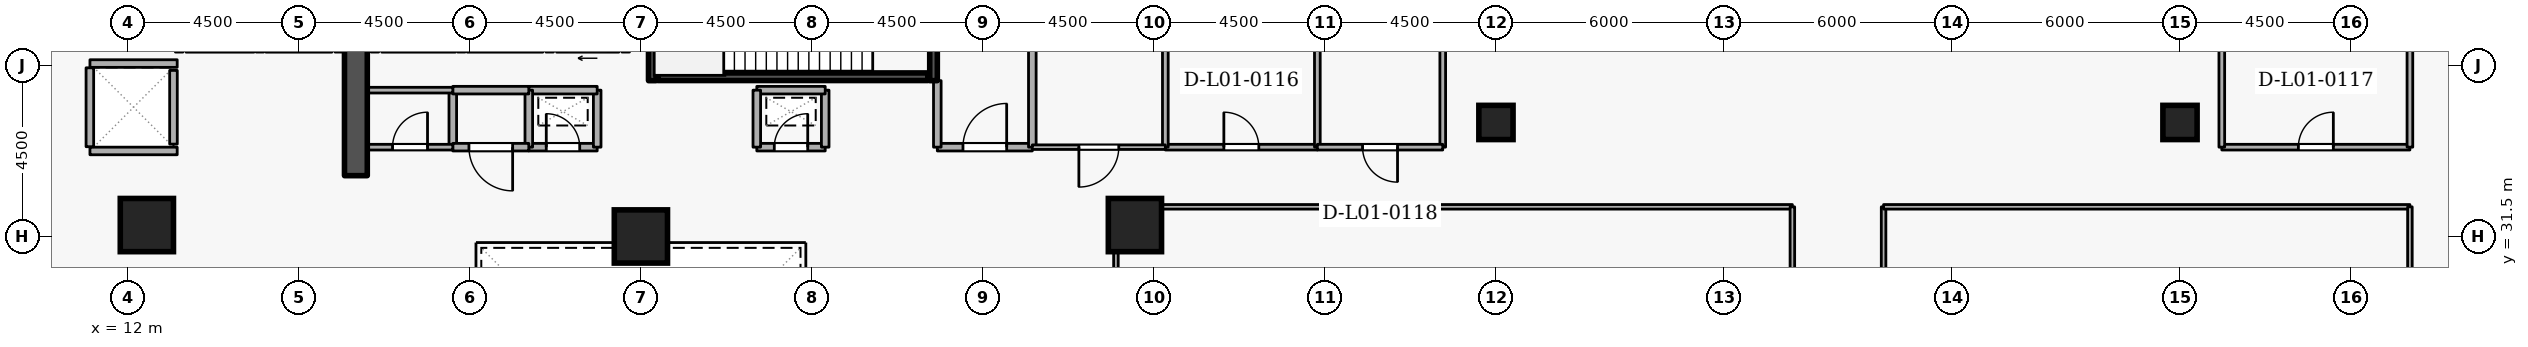
"""IFC4 building model, lengths in metres.
Left out: names, types, materials, properties, quantities, classifications, styles, units other than length and angle.
Written with IfcOpenShell. Run it as: python <this file> out.ifc"""

import sys

from ifc_helpers import new_model, si_unit, direction, frame, frame_2d, origin, origin_2d, place, context, subcontext, project, spatial, rectangle, extrude, element, fill, save


model = new_model("IFC4")
c1 = context("Model", 3, precision=1e-05, world=origin(), true_north=direction((0.0, 1.0)))
c2 = subcontext(c1, "Body", "Model", "MODEL_VIEW")
j1 = project(units=[si_unit("LENGTHUNIT", "METRE"), si_unit("PLANEANGLEUNIT", "RADIAN")], contexts=[c1])
p1 = place(None, origin())
s1 = spatial("IfcSite", under=j1, at=p1, CompositionType="ELEMENT")
p2 = place(p1, origin())
s2 = spatial("IfcBuilding", under=s1, at=p2, CompositionType="ELEMENT")
p3 = place(p2, frame((0.0, 0.0, 4.8)))
s3 = spatial("IfcBuildingStorey", under=s2, at=p3, CompositionType="ELEMENT", Elevation=4.8)
p4 = place(p3, frame((18.0, 33.1, 0.0), z_axis=(0.0, 0.0, 1.0), x_axis=(0.0, 1.0, 0.0)))
e1 = element("IfcWall", 1, at=p4, inside=s3, PredefinedType="SHEAR", context=c2, shape_type="SweptSolid", body=[
    extrude(rectangle(XDim=5.7, YDim=0.6, at=frame_2d((2.85, 0.0))), origin(), (0.0, 0.0, 1.0), 4.8),
])
for number, where, z_axis, x_axis in (
    (2, (12.5, 31.8, 0.0), (0.0, 0.0, 1.0), (1.0, 0.0, 0.0)),
    (3, (38.5, 31.8, 0.0), (0.0, 0.0, 1.0), (1.0, 0.0, 0.0)),
    (4, (25.5, 31.5, 0.0), (0.0, 0.0, 1.0), (1.0, 0.0, 0.0)),
):
    element("IfcColumn", number, at=place(p3, frame(where, z_axis=z_axis, x_axis=x_axis)), inside=s3, PredefinedType="COLUMN", context=c2, shape_type="SweptSolid", body=[
        extrude(rectangle(XDim=1.4, YDim=1.4, at=origin_2d()), origin(), (0.0, 0.0, 1.0), 4.8),
    ])
for number, where, z_axis, x_axis in (
    (5, (48.0, 34.5, 0.0), (0.0, 0.0, 1.0), (1.0, 0.0, 0.0)),
    (6, (66.0, 34.5, 0.0), (0.0, 0.0, 1.0), (1.0, 0.0, 0.0)),
):
    element("IfcColumn", number, at=place(p3, frame(where, z_axis=z_axis, x_axis=x_axis)), inside=s3, PredefinedType="COLUMN", context=c2, shape_type="SweptSolid", body=[
        extrude(rectangle(XDim=0.9, YDim=0.9, at=origin_2d()), origin(), (0.0, 0.0, 1.0), 4.8),
    ])
p5 = place(p3, frame((24.92, 36.45, 0.0), z_axis=(0.0, 0.0, 1.0), x_axis=(-1.0, 0.0, 0.0)))
e7 = element("IfcWall", 7, at=p5, inside=s3, PredefinedType="STANDARD", context=c2, shape_type="SweptSolid", body=[
    extrude(rectangle(XDim=1.64, YDim=0.2, at=frame_2d((0.82, 0.0))), origin(), (0.0, 0.0, 1.0), 4.46),
])
p6 = place(p5, frame((0.31, 0.0, 0.0)))
e8 = element("IfcOpeningElement", 8, at=p6, cuts=e7, PredefinedType="OPENING", context=c2, shape_type="SweptSolid", body=[
    extrude(rectangle(XDim=1.02, YDim=2.06, at=frame_2d((0.51, 1.03))), frame((0.0, 0.11, 0.0), z_axis=(0.0, -1.0, 0.0), x_axis=(1.0, 0.0, 0.0)), (0.0, 0.0, 1.0), 0.22),
])
p7 = place(p3, frame((22.92, 36.45, 0.0), z_axis=(0.0, 0.0, 1.0), x_axis=(-1.0, 0.0, 0.0)))
e9 = element("IfcWall", 9, at=p7, inside=s3, PredefinedType="STANDARD", context=c2, shape_type="SweptSolid", body=[
    extrude(rectangle(XDim=1.99, YDim=0.2, at=frame_2d((0.995, 0.0))), origin(), (0.0, 0.0, 1.0), 4.46),
])
p8 = place(p3, frame((20.62, 36.45, 0.0), z_axis=(0.0, 0.0, 1.0), x_axis=(-1.0, 0.0, 0.0)))
e10 = element("IfcWall", 10, at=p8, inside=s3, PredefinedType="STANDARD", context=c2, shape_type="SweptSolid", body=[
    extrude(rectangle(XDim=1.94, YDim=0.2, at=frame_2d((0.97, 0.0))), origin(), (0.0, 0.0, 1.0), 4.46),
])
p9 = place(p3, frame((17.37, 36.45, 0.0), z_axis=(0.0, 0.0, 1.0), x_axis=(-1.0, 0.0, 0.0)))
e11 = element("IfcWall", 11, at=p9, inside=s3, PredefinedType="STANDARD", context=c2, shape_type="SweptSolid", body=[
    extrude(rectangle(XDim=1.74, YDim=0.2, at=frame_2d((0.87, 0.0))), origin(), (0.0, 0.0, 1.0), 4.46),
])
p10 = place(p3, frame((15.32, 36.45, 0.0), z_axis=(0.0, 0.0, 1.0), x_axis=(-1.0, 0.0, 0.0)))
e12 = element("IfcWall", 12, at=p10, inside=s3, PredefinedType="STANDARD", context=c2, shape_type="SweptSolid", body=[
    extrude(rectangle(XDim=1.79, YDim=0.2, at=frame_2d((0.895, 0.0))), origin(), (0.0, 0.0, 1.0), 4.46),
])
p11 = place(p3, frame((13.2, 33.93, 0.0), z_axis=(0.0, 0.0, 1.0), x_axis=(0.0, 1.0, 0.0)))
e13 = element("IfcWall", 13, at=p11, inside=s3, PredefinedType="STANDARD", context=c2, shape_type="SweptSolid", body=[
    extrude(rectangle(XDim=1.94, YDim=0.2, at=frame_2d((0.97, 0.0))), origin(), (0.0, 0.0, 1.0), 4.46),
])
for number, where, z_axis, x_axis in (
    (14, (11.002, 36.05, 0.0), (0.0, 0.0, 1.0), (1.0, 0.0, 0.0)),
    (15, (11.002, 33.75, 0.0), (0.0, 0.0, 1.0), (1.0, 0.0, 0.0)),
):
    element("IfcWall", number, at=place(p3, frame(where, z_axis=z_axis, x_axis=x_axis)), inside=s3, PredefinedType="STANDARD", context=c2, shape_type="SweptSolid", body=[
        extrude(rectangle(XDim=2.296, YDim=0.2, at=frame_2d((1.148, 0.0))), origin(), (0.0, 0.0, 1.0), 4.46),
    ])
p12 = place(p3, frame((11.0, 33.862, 0.0), z_axis=(0.0, 0.0, 1.0), x_axis=(0.0, 1.0, 0.0)))
e16 = element("IfcWall", 16, at=p12, inside=s3, PredefinedType="STANDARD", context=c2, shape_type="SweptSolid", body=[
    extrude(rectangle(XDim=2.076, YDim=0.2, at=frame_2d((1.038, 0.0))), origin(), (0.0, 0.0, 1.0), 4.46),
])
p13 = place(p3, frame((33.2, 38.95, 0.0), z_axis=(0.0, 0.0, 1.0), x_axis=(0.0, -1.0, 0.0)))
e17 = element("IfcWall", 17, at=p13, inside=s3, PredefinedType="SHEAR", context=c2, shape_type="SweptSolid", body=[
    extrude(rectangle(XDim=3.35, YDim=0.2, at=frame_2d((1.675, 0.0))), origin(), (0.0, 0.0, 1.0), 4.8),
])
p14 = place(p13, frame((1.125, 0.0, 0.0)))
e18 = element("IfcOpeningElement", 18, at=p14, cuts=e17, PredefinedType="OPENING", context=c2, shape_type="SweptSolid", body=[
    extrude(rectangle(XDim=1.1, YDim=2.1, at=frame_2d((0.55, 1.05))), frame((0.0, 0.11, 0.0), z_axis=(0.0, -1.0, 0.0), x_axis=(1.0, 0.0, 0.0)), (0.0, 0.0, 1.0), 0.22),
])
p15 = place(p3, frame((25.8, 35.6, 0.0), z_axis=(0.0, 0.0, 1.0), x_axis=(0.0, 1.0, 0.0)))
e19 = element("IfcWall", 19, at=p15, inside=s3, PredefinedType="SHEAR", context=c2, shape_type="SweptSolid", body=[
    extrude(rectangle(XDim=3.35, YDim=0.2, at=frame_2d((1.675, 0.0))), origin(), (0.0, 0.0, 1.0), 4.8),
])
p16 = place(p3, frame((25.95, 35.703, 0.0), z_axis=(0.0, 0.0, 1.0), x_axis=(1.0, 0.0, 0.0)))
e20 = element("IfcWall", 20, at=p16, inside=s3, PredefinedType="SHEAR", context=c2, shape_type="SweptSolid", body=[
    extrude(rectangle(XDim=7.1, YDim=0.2, at=frame_2d((3.55, 0.0))), origin(), (0.0, 0.0, 1.0), 4.8),
])
p17 = place(p3, frame((33.3, 33.85, 0.0), z_axis=(0.0, 0.0, 1.0), x_axis=(1.0, 0.0, 0.0)))
e21 = element("IfcWall", 21, at=p17, inside=s3, PredefinedType="STANDARD", context=c2, shape_type="SweptSolid", body=[
    extrude(rectangle(XDim=2.5, YDim=0.2, at=frame_2d((1.25, 0.0))), origin(), (0.0, 0.0, 1.0), 4.46),
])
p18 = place(p17, frame((0.675, 0.0, 0.0)))
e22 = element("IfcOpeningElement", 22, at=p18, cuts=e21, PredefinedType="OPENING", context=c2, shape_type="SweptSolid", body=[
    extrude(rectangle(XDim=1.15, YDim=2.1, at=frame_2d((0.575, 1.05))), frame((0.0, 0.11, 0.0), z_axis=(0.0, -1.0, 0.0), x_axis=(1.0, 0.0, 0.0)), (0.0, 0.0, 1.0), 0.22),
])
p19 = place(p3, frame((35.8, 33.85, 0.0), z_axis=(0.0, 0.0, 1.0), x_axis=(0.0, 1.0, 0.0)))
e23 = element("IfcWall", 23, at=p19, inside=s3, PredefinedType="STANDARD", context=c2, shape_type="SweptSolid", body=[
    extrude(rectangle(XDim=5.15, YDim=0.2, at=frame_2d((2.575, 0.0))), origin(), (0.0, 0.0, 1.0), 4.46),
])
p20 = place(p3, frame((33.3, 35.6, 0.0), z_axis=(0.0, 0.0, 1.0), x_axis=(0.0, -1.0, 0.0)))
e24 = element("IfcWall", 24, at=p20, inside=s3, PredefinedType="STANDARD", context=c2, shape_type="SweptSolid", body=[
    extrude(rectangle(XDim=1.75, YDim=0.2, at=frame_2d((0.875, 0.0))), origin(), (0.0, 0.0, 1.0), 3.665),
])
p21 = place(p3, frame((22.55, 33.85, 0.0), z_axis=(0.0, 0.0, 1.0), x_axis=(1.0, 0.0, 0.0)))
e25 = element("IfcWall", 25, at=p21, inside=s3, PredefinedType="STANDARD", context=c2, shape_type="SweptSolid", body=[
    extrude(rectangle(XDim=1.8, YDim=0.2, at=frame_2d((0.9, 0.0))), origin(), (0.0, 0.0, 1.0), 4.46),
])
p22 = place(p21, frame((0.46, 0.0, 0.0)))
e26 = element("IfcOpeningElement", 26, at=p22, cuts=e25, PredefinedType="OPENING", context=c2, shape_type="SweptSolid", body=[
    extrude(rectangle(XDim=0.88, YDim=2.04, at=frame_2d((0.44, 1.02))), frame((0.0, 0.11, 0.0), z_axis=(0.0, -1.0, 0.0), x_axis=(1.0, 0.0, 0.0)), (0.0, 0.0, 1.0), 0.22),
])
p23 = place(p3, frame((24.35, 33.85, 0.0), z_axis=(0.0, 0.0, 1.0), x_axis=(0.0, 1.0, 0.0)))
e27 = element("IfcWall", 27, at=p23, inside=s3, PredefinedType="STANDARD", context=c2, shape_type="SweptSolid", body=[
    extrude(rectangle(XDim=1.5, YDim=0.2, at=frame_2d((0.75, 0.0))), origin(), (0.0, 0.0, 1.0), 4.46),
])
p24 = place(p3, frame((24.35, 35.35, 0.0), z_axis=(0.0, 0.0, 1.0), x_axis=(-1.0, 0.0, 0.0)))
e28 = element("IfcWall", 28, at=p24, inside=s3, PredefinedType="STANDARD", context=c2, shape_type="SweptSolid", body=[
    extrude(rectangle(XDim=1.8, YDim=0.2, at=frame_2d((0.9, 0.0))), origin(), (0.0, 0.0, 1.0), 4.46),
])
p25 = place(p3, frame((22.55, 35.35, 0.0), z_axis=(0.0, 0.0, 1.0), x_axis=(0.0, -1.0, 0.0)))
e29 = element("IfcWall", 29, at=p25, inside=s3, PredefinedType="STANDARD", context=c2, shape_type="SweptSolid", body=[
    extrude(rectangle(XDim=1.5, YDim=0.2, at=frame_2d((0.75, 0.0))), origin(), (0.0, 0.0, 1.0), 4.46),
])
p26 = place(p3, frame((28.55, 33.85, 0.0), z_axis=(0.0, 0.0, 1.0), x_axis=(1.0, 0.0, 0.0)))
e30 = element("IfcWall", 30, at=p26, inside=s3, PredefinedType="STANDARD", context=c2, shape_type="SweptSolid", body=[
    extrude(rectangle(XDim=1.8, YDim=0.2, at=frame_2d((0.9, 0.0))), origin(), (0.0, 0.0, 1.0), 4.46),
])
p27 = place(p26, frame((0.46, 0.0, 0.0)))
e31 = element("IfcOpeningElement", 31, at=p27, cuts=e30, PredefinedType="OPENING", context=c2, shape_type="SweptSolid", body=[
    extrude(rectangle(XDim=0.88, YDim=2.04, at=frame_2d((0.44, 1.02))), frame((0.0, 0.11, 0.0), z_axis=(0.0, -1.0, 0.0), x_axis=(1.0, 0.0, 0.0)), (0.0, 0.0, 1.0), 0.22),
])
p28 = place(p3, frame((30.35, 33.85, 0.0), z_axis=(0.0, 0.0, 1.0), x_axis=(0.0, 1.0, 0.0)))
e32 = element("IfcWall", 32, at=p28, inside=s3, PredefinedType="STANDARD", context=c2, shape_type="SweptSolid", body=[
    extrude(rectangle(XDim=1.5, YDim=0.2, at=frame_2d((0.75, 0.0))), origin(), (0.0, 0.0, 1.0), 4.46),
])
p29 = place(p3, frame((30.35, 35.35, 0.0), z_axis=(0.0, 0.0, 1.0), x_axis=(-1.0, 0.0, 0.0)))
e33 = element("IfcWall", 33, at=p29, inside=s3, PredefinedType="STANDARD", context=c2, shape_type="SweptSolid", body=[
    extrude(rectangle(XDim=1.8, YDim=0.2, at=frame_2d((0.9, 0.0))), origin(), (0.0, 0.0, 1.0), 4.46),
])
for number, where, z_axis, x_axis in (
    (34, (28.55, 35.35, 0.0), (0.0, 0.0, 1.0), (0.0, -1.0, 0.0)),
    (35, (20.55, 33.85, 0.0), (0.0, 0.0, 1.0), (0.0, 1.0, 0.0)),
):
    element("IfcWall", number, at=place(p3, frame(where, z_axis=z_axis, x_axis=x_axis)), inside=s3, PredefinedType="STANDARD", context=c2, shape_type="SweptSolid", body=[
        extrude(rectangle(XDim=1.5, YDim=0.2, at=frame_2d((0.75, 0.0))), origin(), (0.0, 0.0, 1.0), 4.46),
    ])
p30 = place(p3, frame((20.55, 35.35, 0.0), z_axis=(0.0, 0.0, 1.0), x_axis=(1.0, 0.0, 0.0)))
e36 = element("IfcWall", 36, at=p30, inside=s3, PredefinedType="STANDARD", context=c2, shape_type="SweptSolid", body=[
    extrude(rectangle(XDim=2.0, YDim=0.2, at=frame_2d((1.0, 0.0))), origin(), (0.0, 0.0, 1.0), 4.46),
])
p31 = place(p3, frame((22.55, 33.85, 0.0), z_axis=(0.0, 0.0, 1.0), x_axis=(-1.0, 0.0, 0.0)))
e37 = element("IfcWall", 37, at=p31, inside=s3, PredefinedType="STANDARD", context=c2, shape_type="SweptSolid", body=[
    extrude(rectangle(XDim=2.0, YDim=0.2, at=frame_2d((1.0, 0.0))), origin(), (0.0, 0.0, 1.0), 4.46),
])
p32 = place(p31, frame((0.425, 0.0, 0.0)))
e38 = element("IfcOpeningElement", 38, at=p32, cuts=e37, PredefinedType="OPENING", context=c2, shape_type="SweptSolid", body=[
    extrude(rectangle(XDim=1.15, YDim=2.1, at=frame_2d((0.575, 1.05))), frame((0.0, 0.11, 0.0), z_axis=(0.0, -1.0, 0.0), x_axis=(1.0, 0.0, 0.0)), (0.0, 0.0, 1.0), 0.22),
])
p33 = place(p3, frame((18.3, 33.85, 0.0), z_axis=(0.0, 0.0, 1.0), x_axis=(1.0, 0.0, 0.0)))
e39 = element("IfcWall", 39, at=p33, inside=s3, PredefinedType="PARTITIONING", context=c2, shape_type="SweptSolid", body=[
    extrude(rectangle(XDim=2.25, YDim=0.15, at=frame_2d((1.125, 0.0))), origin(), (0.0, 0.0, 1.0), 4.46),
])
p34 = place(p33, frame((0.665, 0.0, 0.0)))
e40 = element("IfcOpeningElement", 40, at=p34, cuts=e39, PredefinedType="OPENING", context=c2, shape_type="SweptSolid", body=[
    extrude(rectangle(XDim=0.92, YDim=2.08, at=frame_2d((0.46, 1.04))), frame((0.0, 0.085, 0.0), z_axis=(0.0, -1.0, 0.0), x_axis=(1.0, 0.0, 0.0)), (0.0, 0.0, 1.0), 0.17),
])
p35 = place(p3, frame((20.55, 35.35, 0.0), z_axis=(0.0, 0.0, 1.0), x_axis=(-1.0, 0.0, 0.0)))
e41 = element("IfcWall", 41, at=p35, inside=s3, PredefinedType="PARTITIONING", context=c2, shape_type="SweptSolid", body=[
    extrude(rectangle(XDim=2.25, YDim=0.15, at=frame_2d((1.125, 0.0))), origin(), (0.0, 0.0, 1.0), 4.46),
])
p36 = place(p3, frame((39.3, 33.85, 0.0), z_axis=(0.0, 0.0, 1.0), x_axis=(1.0, 0.0, 0.0)))
e42 = element("IfcWall", 42, at=p36, inside=s3, PredefinedType="PARTITIONING", context=c2, shape_type="SweptSolid", body=[
    extrude(rectangle(XDim=4.0, YDim=0.15, at=frame_2d((2.0, 0.0))), origin(), (0.0, 0.0, 1.0), 4.46),
])
p37 = place(p36, frame((1.54, 0.0, 0.0)))
e43 = element("IfcOpeningElement", 43, at=p37, cuts=e42, PredefinedType="OPENING", context=c2, shape_type="SweptSolid", body=[
    extrude(rectangle(XDim=0.92, YDim=2.08, at=frame_2d((0.46, 1.04))), frame((0.0, 0.085, 0.0), z_axis=(0.0, -1.0, 0.0), x_axis=(1.0, 0.0, 0.0)), (0.0, 0.0, 1.0), 0.17),
])
for number, where, z_axis, x_axis in (
    (44, (43.3, 33.85, 0.0), (0.0, 0.0, 1.0), (0.0, 1.0, 0.0)),
    (45, (39.3, 37.8, 0.0), (0.0, 0.0, 1.0), (0.0, -1.0, 0.0)),
):
    element("IfcWall", number, at=place(p3, frame(where, z_axis=z_axis, x_axis=x_axis)), inside=s3, PredefinedType="PARTITIONING", context=c2, shape_type="SweptSolid", body=[
        extrude(rectangle(XDim=3.95, YDim=0.15, at=frame_2d((1.975, 0.0))), origin(), (0.0, 0.0, 1.0), 4.46),
    ])
p38 = place(p3, frame((67.1, 33.85, 0.0), z_axis=(0.0, 0.0, 1.0), x_axis=(1.0, 0.0, 0.0)))
e46 = element("IfcWall", 46, at=p38, inside=s3, PredefinedType="PARTITIONING", context=c2, shape_type="SweptSolid", body=[
    extrude(rectangle(XDim=4.95, YDim=0.15, at=frame_2d((2.475, 0.0))), origin(), (0.0, 0.0, 1.0), 4.46),
])
p39 = place(p38, frame((2.015, 0.0, 0.0)))
e47 = element("IfcOpeningElement", 47, at=p39, cuts=e46, PredefinedType="OPENING", context=c2, shape_type="SweptSolid", body=[
    extrude(rectangle(XDim=0.92, YDim=2.08, at=frame_2d((0.46, 1.04))), frame((0.0, 0.085, 0.0), z_axis=(0.0, -1.0, 0.0), x_axis=(1.0, 0.0, 0.0)), (0.0, 0.0, 1.0), 0.17),
])
for number, where, z_axis, x_axis in (
    (48, (72.05, 33.85, 0.0), (0.0, 0.0, 1.0), (0.0, 1.0, 0.0)),
    (49, (67.1, 37.8, 0.0), (0.0, 0.0, 1.0), (0.0, -1.0, 0.0)),
    (50, (46.6, 37.8, 0.0), (0.0, 0.0, 1.0), (0.0, -1.0, 0.0)),
):
    element("IfcWall", number, at=place(p3, frame(where, z_axis=z_axis, x_axis=x_axis)), inside=s3, PredefinedType="PARTITIONING", context=c2, shape_type="SweptSolid", body=[
        extrude(rectangle(XDim=3.95, YDim=0.15, at=frame_2d((1.975, 0.0))), origin(), (0.0, 0.0, 1.0), 4.46),
    ])
p40 = place(p3, frame((46.6, 33.85, 0.0), z_axis=(0.0, 0.0, 1.0), x_axis=(-1.0, 0.0, 0.0)))
e51 = element("IfcWall", 51, at=p40, inside=s3, PredefinedType="PARTITIONING", context=c2, shape_type="SweptSolid", body=[
    extrude(rectangle(XDim=3.3, YDim=0.15, at=frame_2d((1.65, 0.0))), origin(), (0.0, 0.0, 1.0), 4.46),
])
p41 = place(p40, frame((1.19, 0.0, 0.0)))
e52 = element("IfcOpeningElement", 52, at=p41, cuts=e51, PredefinedType="OPENING", context=c2, shape_type="SweptSolid", body=[
    extrude(rectangle(XDim=0.92, YDim=2.08, at=frame_2d((0.46, 1.04))), frame((0.0, 0.085, 0.0), z_axis=(0.0, -1.0, 0.0), x_axis=(1.0, 0.0, 0.0)), (0.0, 0.0, 1.0), 0.17),
])
p42 = place(p3, frame((38.0, 22.3, 0.0), z_axis=(0.0, 0.0, 1.0), x_axis=(0.0, 1.0, 0.0)))
e53 = element("IfcWall", 53, at=p42, inside=s3, PredefinedType="PARTITIONING", context=c2, shape_type="SweptSolid", body=[
    extrude(rectangle(XDim=9.98, YDim=0.12, at=frame_2d((4.99, 0.0))), origin(), (0.0, 0.0, 1.0), 4.46),
])
p43 = place(p3, frame((38.0, 32.28, 0.0), z_axis=(0.0, 0.0, 1.0), x_axis=(1.0, 0.0, 0.0)))
e54 = element("IfcWall", 54, at=p43, inside=s3, PredefinedType="PARTITIONING", context=c2, shape_type="SweptSolid", body=[
    extrude(rectangle(XDim=17.8, YDim=0.12, at=frame_2d((8.9, 0.0))), origin(), (0.0, 0.0, 1.0), 4.46),
])
for number, where, z_axis, x_axis in (
    (55, (55.8, 32.28, 0.0), (0.0, 0.0, 1.0), (0.0, -1.0, 0.0)),
    (56, (58.2, 22.3, 0.0), (0.0, 0.0, 1.0), (0.0, 1.0, 0.0)),
):
    element("IfcWall", number, at=place(p3, frame(where, z_axis=z_axis, x_axis=x_axis)), inside=s3, PredefinedType="PARTITIONING", context=c2, shape_type="SweptSolid", body=[
        extrude(rectangle(XDim=9.98, YDim=0.12, at=frame_2d((4.99, 0.0))), origin(), (0.0, 0.0, 1.0), 4.46),
    ])
p44 = place(p3, frame((58.2, 32.28, 0.0), z_axis=(0.0, 0.0, 1.0), x_axis=(1.0, 0.0, 0.0)))
e57 = element("IfcWall", 57, at=p44, inside=s3, PredefinedType="PARTITIONING", context=c2, shape_type="SweptSolid", body=[
    extrude(rectangle(XDim=13.85, YDim=0.12, at=frame_2d((6.925, 0.0))), origin(), (0.0, 0.0, 1.0), 4.46),
])
p45 = place(p3, frame((72.05, 32.28, 0.0), z_axis=(0.0, 0.0, 1.0), x_axis=(0.0, -1.0, 0.0)))
e58 = element("IfcWall", 58, at=p45, inside=s3, PredefinedType="PARTITIONING", context=c2, shape_type="SweptSolid", body=[
    extrude(rectangle(XDim=9.98, YDim=0.12, at=frame_2d((4.99, 0.0))), origin(), (0.0, 0.0, 1.0), 4.46),
])
p46 = place(p3, frame((39.3, 33.85, 0.0), z_axis=(0.0, 0.0, 1.0), x_axis=(-1.0, 0.0, 0.0)))
e59 = element("IfcWall", 59, at=p46, inside=s3, PredefinedType="PARTITIONING", context=c2, shape_type="SweptSolid", body=[
    extrude(rectangle(XDim=3.5, YDim=0.12, at=frame_2d((1.75, 0.0))), origin(), (0.0, 0.0, 1.0), 4.46),
])
p47 = place(p46, frame((1.225, 0.0, 0.0)))
e60 = element("IfcOpeningElement", 60, at=p47, cuts=e59, PredefinedType="OPENING", context=c2, shape_type="SweptSolid", body=[
    extrude(rectangle(XDim=1.05, YDim=2.1, at=frame_2d((0.525, 1.05))), frame((0.0, 0.07, 0.0), z_axis=(0.0, -1.0, 0.0), x_axis=(1.0, 0.0, 0.0)), (0.0, 0.0, 1.0), 0.14),
])
p48 = place(p18, origin())
e61 = element("IfcDoor", 61, at=p48, inside=s3, OperationType="SINGLE_SWING_RIGHT", PredefinedType="DOOR", context=c2, shape_type="SweptSolid", body=[
    extrude(rectangle(XDim=1.15, YDim=2.1, at=frame_2d((0.575, 1.05))), frame((0.0, 0.025, 0.0), z_axis=(0.0, -1.0, 0.0), x_axis=(1.0, 0.0, 0.0)), (0.0, 0.0, 1.0), 0.05),
])
fill(e22, e61)
p49 = place(p22, origin())
e62 = element("IfcDoor", 62, at=p49, inside=s3, OperationType="SINGLE_SWING_LEFT", PredefinedType="DOOR", context=c2, shape_type="SweptSolid", body=[
    extrude(rectangle(XDim=0.88, YDim=2.04, at=frame_2d((0.44, 1.02))), frame((0.0, 0.025, 0.0), z_axis=(0.0, -1.0, 0.0), x_axis=(1.0, 0.0, 0.0)), (0.0, 0.0, 1.0), 0.05),
])
fill(e26, e62)
p50 = place(p27, origin())
e63 = element("IfcDoor", 63, at=p50, inside=s3, OperationType="SINGLE_SWING_RIGHT", PredefinedType="DOOR", context=c2, shape_type="SweptSolid", body=[
    extrude(rectangle(XDim=0.88, YDim=2.04, at=frame_2d((0.44, 1.02))), frame((0.0, 0.025, 0.0), z_axis=(0.0, -1.0, 0.0), x_axis=(1.0, 0.0, 0.0)), (0.0, 0.0, 1.0), 0.05),
])
fill(e31, e63)
p51 = place(p34, origin())
e64 = element("IfcDoor", 64, at=p51, inside=s3, OperationType="SINGLE_SWING_RIGHT", PredefinedType="DOOR", context=c2, shape_type="SweptSolid", body=[
    extrude(rectangle(XDim=0.92, YDim=2.08, at=frame_2d((0.46, 1.04))), frame((0.0, 0.025, 0.0), z_axis=(0.0, -1.0, 0.0), x_axis=(1.0, 0.0, 0.0)), (0.0, 0.0, 1.0), 0.05),
])
fill(e40, e64)
p52 = place(p32, origin())
e65 = element("IfcDoor", 65, at=p52, inside=s3, OperationType="SINGLE_SWING_LEFT", PredefinedType="DOOR", context=c2, shape_type="SweptSolid", body=[
    extrude(rectangle(XDim=1.15, YDim=2.1, at=frame_2d((0.575, 1.05))), frame((0.0, 0.025, 0.0), z_axis=(0.0, -1.0, 0.0), x_axis=(1.0, 0.0, 0.0)), (0.0, 0.0, 1.0), 0.05),
])
fill(e38, e65)
p53 = place(p37, origin())
e66 = element("IfcDoor", 66, at=p53, inside=s3, OperationType="SINGLE_SWING_LEFT", PredefinedType="DOOR", context=c2, shape_type="SweptSolid", body=[
    extrude(rectangle(XDim=0.92, YDim=2.08, at=frame_2d((0.46, 1.04))), frame((0.0, 0.025, 0.0), z_axis=(0.0, -1.0, 0.0), x_axis=(1.0, 0.0, 0.0)), (0.0, 0.0, 1.0), 0.05),
])
fill(e43, e66)
p54 = place(p39, origin())
e67 = element("IfcDoor", 67, at=p54, inside=s3, OperationType="SINGLE_SWING_RIGHT", PredefinedType="DOOR", context=c2, shape_type="SweptSolid", body=[
    extrude(rectangle(XDim=0.92, YDim=2.08, at=frame_2d((0.46, 1.04))), frame((0.0, 0.025, 0.0), z_axis=(0.0, -1.0, 0.0), x_axis=(1.0, 0.0, 0.0)), (0.0, 0.0, 1.0), 0.05),
])
fill(e47, e67)
p55 = place(p41, origin())
e68 = element("IfcDoor", 68, at=p55, inside=s3, OperationType="SINGLE_SWING_LEFT", PredefinedType="DOOR", context=c2, shape_type="SweptSolid", body=[
    extrude(rectangle(XDim=0.92, YDim=2.08, at=frame_2d((0.46, 1.04))), frame((0.0, 0.025, 0.0), z_axis=(0.0, -1.0, 0.0), x_axis=(1.0, 0.0, 0.0)), (0.0, 0.0, 1.0), 0.05),
])
fill(e52, e68)
p56 = place(p47, origin())
e69 = element("IfcDoor", 69, at=p56, inside=s3, OperationType="SINGLE_SWING_RIGHT", PredefinedType="DOOR", context=c2, shape_type="SweptSolid", body=[
    extrude(rectangle(XDim=1.05, YDim=2.1, at=frame_2d((0.525, 1.05))), frame((0.0, 0.025, 0.0), z_axis=(0.0, -1.0, 0.0), x_axis=(1.0, 0.0, 0.0)), (0.0, 0.0, 1.0), 0.05),
])
fill(e60, e69)
save(model, sys.argv[1])
